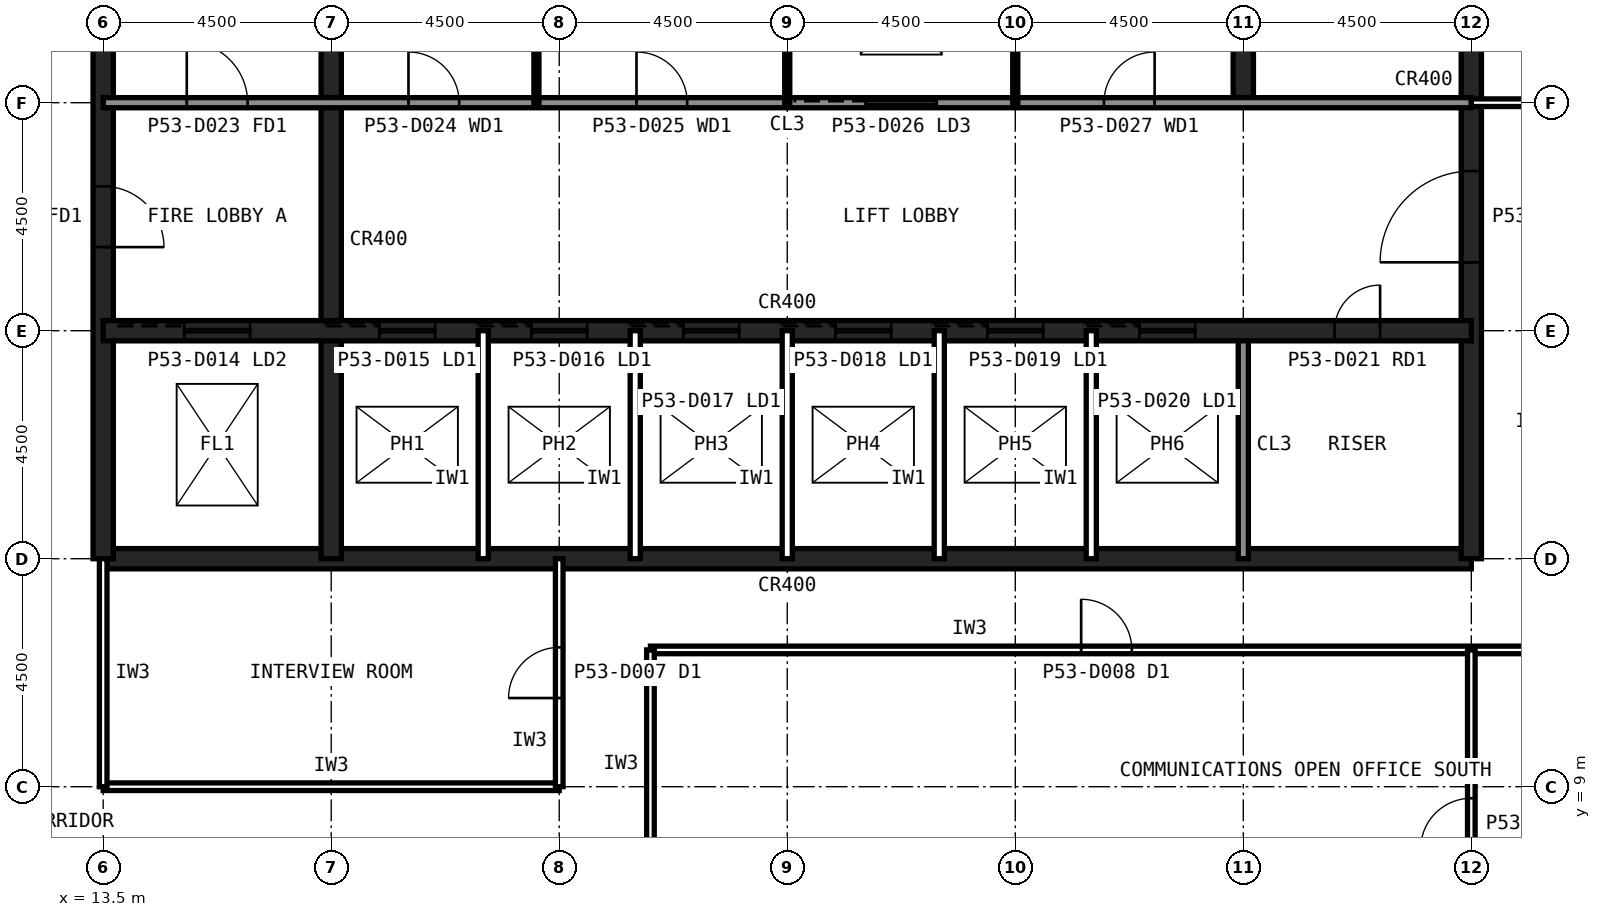
"""IFC4 building model, lengths in metres.
Left out: names, types, materials, properties, quantities, classifications, styles, units other than length and angle.
Written with IfcOpenShell. Run it as: python <this file> out.ifc"""

import sys

from ifc_helpers import new_model, si_unit, direction, frame, frame_2d, origin, place, context, subcontext, project, spatial, rectangle, extrude, element, fill, save


model = new_model("IFC4")
c1 = context("Model", 3, precision=1e-05, world=origin(), true_north=direction((0.0, 1.0)))
c2 = subcontext(c1, "Body", "Model", "MODEL_VIEW")
j1 = project(units=[si_unit("LENGTHUNIT", "METRE"), si_unit("PLANEANGLEUNIT", "RADIAN")], contexts=[c1])
p1 = place(None, origin())
s1 = spatial("IfcSite", under=j1, at=p1, CompositionType="ELEMENT")
p2 = place(p1, origin())
s2 = spatial("IfcBuilding", under=s1, at=p2, CompositionType="ELEMENT")
p3 = place(p2, frame((0.0, 0.0, 222.6)))
s3 = spatial("IfcBuildingStorey", under=s2, at=p3, CompositionType="ELEMENT", Elevation=222.6)
p4 = place(p3, frame((13.5, 13.5, 0.0), z_axis=(0.0, 0.0, 1.0), x_axis=(1.0, 0.0, 0.0)))
e1 = element("IfcWall", 1, at=p4, inside=s3, PredefinedType="SHEAR", context=c2, shape_type="SweptSolid", body=[
    extrude(rectangle(XDim=27.0, YDim=0.4, at=frame_2d((13.5, 0.0))), origin(), (0.0, 0.0, 1.0), 4.0),
])
p5 = place(p3, frame((40.5, 13.5, 0.0), z_axis=(0.0, 0.0, 1.0), x_axis=(0.0, 1.0, 0.0)))
e2 = element("IfcWall", 2, at=p5, inside=s3, PredefinedType="SHEAR", context=c2, shape_type="SweptSolid", body=[
    extrude(rectangle(XDim=27.0, YDim=0.4, at=frame_2d((13.5, 0.0))), origin(), (0.0, 0.0, 1.0), 4.0),
])
p6 = place(p5, frame((5.85, 0.0, 0.0)))
e3 = element("IfcOpeningElement", 3, at=p6, cuts=e2, PredefinedType="OPENING", context=c2, shape_type="SweptSolid", body=[
    extrude(rectangle(XDim=1.8, YDim=2.1, at=frame_2d((0.9, 1.05))), frame((0.0, 0.21, 0.0), z_axis=(0.0, -1.0, 0.0), x_axis=(1.0, 0.0, 0.0)), (0.0, 0.0, 1.0), 0.42),
])
p7 = place(p5, frame((19.65, 0.0, 0.0)))
e4 = element("IfcOpeningElement", 4, at=p7, cuts=e2, PredefinedType="OPENING", context=c2, shape_type="SweptSolid", body=[
    extrude(rectangle(XDim=1.2, YDim=2.1, at=frame_2d((0.6, 1.05))), frame((0.0, 0.21, 0.0), z_axis=(0.0, -1.0, 0.0), x_axis=(1.0, 0.0, 0.0)), (0.0, 0.0, 1.0), 0.42),
])
p8 = place(p3, frame((13.5, 40.5, 0.0), z_axis=(0.0, 0.0, 1.0), x_axis=(0.0, -1.0, 0.0)))
e5 = element("IfcWall", 5, at=p8, inside=s3, PredefinedType="SHEAR", context=c2, shape_type="SweptSolid", body=[
    extrude(rectangle(XDim=27.0, YDim=0.4, at=frame_2d((13.5, 0.0))), origin(), (0.0, 0.0, 1.0), 4.0),
])
p9 = place(p8, frame((19.65, 0.0, 0.0)))
e6 = element("IfcOpeningElement", 6, at=p9, cuts=e5, PredefinedType="OPENING", context=c2, shape_type="SweptSolid", body=[
    extrude(rectangle(XDim=1.2, YDim=2.1, at=frame_2d((0.6, 1.05))), frame((0.0, 0.21, 0.0), z_axis=(0.0, -1.0, 0.0), x_axis=(1.0, 0.0, 0.0)), (0.0, 0.0, 1.0), 0.42),
])
p10 = place(p8, frame((5.85, 0.0, 0.0)))
e7 = element("IfcOpeningElement", 7, at=p10, cuts=e5, PredefinedType="OPENING", context=c2, shape_type="SweptSolid", body=[
    extrude(rectangle(XDim=1.8, YDim=2.1, at=frame_2d((0.9, 1.05))), frame((0.0, 0.21, 0.0), z_axis=(0.0, -1.0, 0.0), x_axis=(1.0, 0.0, 0.0)), (0.0, 0.0, 1.0), 0.42),
])
p11 = place(p3, frame((18.0, 13.5, 0.0), z_axis=(0.0, 0.0, 1.0), x_axis=(0.0, 1.0, 0.0)))
e8 = element("IfcWall", 8, at=p11, inside=s3, PredefinedType="SHEAR", context=c2, shape_type="SweptSolid", body=[
    extrude(rectangle(XDim=18.0, YDim=0.4, at=frame_2d((9.0, 0.0))), origin(), (0.0, 0.0, 1.0), 4.0),
])
p12 = place(p3, frame((36.0, 13.5, 0.0), z_axis=(0.0, 0.0, 1.0), x_axis=(0.0, 1.0, 0.0)))
e9 = element("IfcWall", 9, at=p12, inside=s3, PredefinedType="SOLIDWALL", context=c2, shape_type="SweptSolid", body=[
    extrude(rectangle(XDim=4.5, YDim=0.2, at=frame_2d((2.25, 0.0))), origin(), (0.0, 0.0, 1.0), 3.84),
])
p13 = place(p3, frame((36.0, 22.5, 0.0), z_axis=(0.0, 0.0, 1.0), x_axis=(0.0, 1.0, 0.0)))
e10 = element("IfcWall", 10, at=p13, inside=s3, PredefinedType="SHEAR", context=c2, shape_type="SweptSolid", body=[
    extrude(rectangle(XDim=18.0, YDim=0.4, at=frame_2d((9.0, 0.0))), origin(), (0.0, 0.0, 1.0), 4.0),
])
p14 = place(p3, frame((13.5, 18.0, 0.0), z_axis=(0.0, 0.0, 1.0), x_axis=(1.0, 0.0, 0.0)))
e11 = element("IfcWall", 11, at=p14, inside=s3, PredefinedType="SHEAR", context=c2, shape_type="SweptSolid", body=[
    extrude(rectangle(XDim=27.0, YDim=0.4, at=frame_2d((13.5, 0.0))), origin(), (0.0, 0.0, 1.0), 4.0),
])
p15 = place(p14, frame((24.3, 0.0, 0.0)))
e12 = element("IfcOpeningElement", 12, at=p15, cuts=e11, PredefinedType="OPENING", context=c2, shape_type="SweptSolid", body=[
    extrude(rectangle(XDim=0.9, YDim=2.1, at=frame_2d((0.45, 1.05))), frame((0.0, 0.21, 0.0), z_axis=(0.0, -1.0, 0.0), x_axis=(1.0, 0.0, 0.0)), (0.0, 0.0, 1.0), 0.42),
])
p16 = place(p14, frame((5.45, 0.0, 0.0)))
e13 = element("IfcOpeningElement", 13, at=p16, cuts=e11, PredefinedType="OPENING", context=c2, shape_type="SweptSolid", body=[
    extrude(rectangle(XDim=1.1, YDim=2.1, at=frame_2d((0.55, 1.05))), frame((0.0, 0.21, 0.0), z_axis=(0.0, -1.0, 0.0), x_axis=(1.0, 0.0, 0.0)), (0.0, 0.0, 1.0), 0.42),
])
p17 = place(p14, frame((8.45, 0.0, 0.0)))
e14 = element("IfcOpeningElement", 14, at=p17, cuts=e11, PredefinedType="OPENING", context=c2, shape_type="SweptSolid", body=[
    extrude(rectangle(XDim=1.1, YDim=2.1, at=frame_2d((0.55, 1.05))), frame((0.0, 0.21, 0.0), z_axis=(0.0, -1.0, 0.0), x_axis=(1.0, 0.0, 0.0)), (0.0, 0.0, 1.0), 0.42),
])
p18 = place(p14, frame((11.45, 0.0, 0.0)))
e15 = element("IfcOpeningElement", 15, at=p18, cuts=e11, PredefinedType="OPENING", context=c2, shape_type="SweptSolid", body=[
    extrude(rectangle(XDim=1.1, YDim=2.1, at=frame_2d((0.55, 1.05))), frame((0.0, 0.21, 0.0), z_axis=(0.0, -1.0, 0.0), x_axis=(1.0, 0.0, 0.0)), (0.0, 0.0, 1.0), 0.42),
])
p19 = place(p14, frame((14.45, 0.0, 0.0)))
e16 = element("IfcOpeningElement", 16, at=p19, cuts=e11, PredefinedType="OPENING", context=c2, shape_type="SweptSolid", body=[
    extrude(rectangle(XDim=1.1, YDim=2.1, at=frame_2d((0.55, 1.05))), frame((0.0, 0.21, 0.0), z_axis=(0.0, -1.0, 0.0), x_axis=(1.0, 0.0, 0.0)), (0.0, 0.0, 1.0), 0.42),
])
p20 = place(p14, frame((17.45, 0.0, 0.0)))
e17 = element("IfcOpeningElement", 17, at=p20, cuts=e11, PredefinedType="OPENING", context=c2, shape_type="SweptSolid", body=[
    extrude(rectangle(XDim=1.1, YDim=2.1, at=frame_2d((0.55, 1.05))), frame((0.0, 0.21, 0.0), z_axis=(0.0, -1.0, 0.0), x_axis=(1.0, 0.0, 0.0)), (0.0, 0.0, 1.0), 0.42),
])
p21 = place(p14, frame((20.45, 0.0, 0.0)))
e18 = element("IfcOpeningElement", 18, at=p21, cuts=e11, PredefinedType="OPENING", context=c2, shape_type="SweptSolid", body=[
    extrude(rectangle(XDim=1.1, YDim=2.1, at=frame_2d((0.55, 1.05))), frame((0.0, 0.21, 0.0), z_axis=(0.0, -1.0, 0.0), x_axis=(1.0, 0.0, 0.0)), (0.0, 0.0, 1.0), 0.42),
])
p22 = place(p14, frame((1.6, 0.0, 0.0)))
e19 = element("IfcOpeningElement", 19, at=p22, cuts=e11, PredefinedType="OPENING", context=c2, shape_type="SweptSolid", body=[
    extrude(rectangle(XDim=1.3, YDim=2.2, at=frame_2d((0.65, 1.1))), frame((0.0, 0.21, 0.0), z_axis=(0.0, -1.0, 0.0), x_axis=(1.0, 0.0, 0.0)), (0.0, 0.0, 1.0), 0.42),
])
p23 = place(p3, frame((13.5, 22.5, 0.0), z_axis=(0.0, 0.0, 1.0), x_axis=(1.0, 0.0, 0.0)))
e20 = element("IfcWall", 20, at=p23, inside=s3, PredefinedType="SOLIDWALL", context=c2, shape_type="SweptSolid", body=[
    extrude(rectangle(XDim=27.0, YDim=0.2, at=frame_2d((13.5, 0.0))), origin(), (0.0, 0.0, 1.0), 3.84),
])
p24 = place(p23, frame((1.65, 0.0, 0.0)))
e21 = element("IfcOpeningElement", 21, at=p24, cuts=e20, PredefinedType="OPENING", context=c2, shape_type="SweptSolid", body=[
    extrude(rectangle(XDim=1.2, YDim=2.1, at=frame_2d((0.6, 1.05))), frame((0.0, 0.11, 0.0), z_axis=(0.0, -1.0, 0.0), x_axis=(1.0, 0.0, 0.0)), (0.0, 0.0, 1.0), 0.22),
])
p25 = place(p23, frame((6.025, 0.0, 0.0)))
e22 = element("IfcOpeningElement", 22, at=p25, cuts=e20, PredefinedType="OPENING", context=c2, shape_type="SweptSolid", body=[
    extrude(rectangle(XDim=1.0, YDim=2.1, at=frame_2d((0.5, 1.05))), frame((0.0, 0.11, 0.0), z_axis=(0.0, -1.0, 0.0), x_axis=(1.0, 0.0, 0.0)), (0.0, 0.0, 1.0), 0.22),
])
p26 = place(p23, frame((10.525, 0.0, 0.0)))
e23 = element("IfcOpeningElement", 23, at=p26, cuts=e20, PredefinedType="OPENING", context=c2, shape_type="SweptSolid", body=[
    extrude(rectangle(XDim=1.0, YDim=2.1, at=frame_2d((0.5, 1.05))), frame((0.0, 0.11, 0.0), z_axis=(0.0, -1.0, 0.0), x_axis=(1.0, 0.0, 0.0)), (0.0, 0.0, 1.0), 0.22),
])
p27 = place(p23, frame((19.75, 0.0, 0.0)))
e24 = element("IfcOpeningElement", 24, at=p27, cuts=e20, PredefinedType="OPENING", context=c2, shape_type="SweptSolid", body=[
    extrude(rectangle(XDim=1.0, YDim=2.1, at=frame_2d((0.5, 1.05))), frame((0.0, 0.11, 0.0), z_axis=(0.0, -1.0, 0.0), x_axis=(1.0, 0.0, 0.0)), (0.0, 0.0, 1.0), 0.22),
])
p28 = place(p23, frame((15.05, 0.0, 0.0)))
e25 = element("IfcOpeningElement", 25, at=p28, cuts=e20, PredefinedType="OPENING", context=c2, shape_type="SweptSolid", body=[
    extrude(rectangle(XDim=1.4, YDim=2.4, at=frame_2d((0.7, 1.2))), frame((0.0, 0.11, 0.0), z_axis=(0.0, -1.0, 0.0), x_axis=(1.0, 0.0, 0.0)), (0.0, 0.0, 1.0), 0.22),
])
for number, where, z_axis, x_axis in (
    (26, (21.0, 13.5, 0.0), (0.0, 0.0, 1.0), (0.0, 1.0, 0.0)),
    (27, (24.0, 13.5, 0.0), (0.0, 0.0, 1.0), (0.0, 1.0, 0.0)),
    (28, (27.0, 13.5, 0.0), (0.0, 0.0, 1.0), (0.0, 1.0, 0.0)),
    (29, (30.0, 13.5, 0.0), (0.0, 0.0, 1.0), (0.0, 1.0, 0.0)),
    (30, (33.0, 13.5, 0.0), (0.0, 0.0, 1.0), (0.0, 1.0, 0.0)),
):
    element("IfcWall", number, at=place(p3, frame(where, z_axis=z_axis, x_axis=x_axis)), inside=s3, PredefinedType="PARTITIONING", context=c2, shape_type="SweptSolid", body=[
        extrude(rectangle(XDim=4.5, YDim=0.2, at=frame_2d((2.25, 0.0))), origin(), (0.0, 0.0, 1.0), 3.84),
    ])
for number, where, z_axis, x_axis in (
    (31, (22.05, 22.5, 0.0), (0.0, 0.0, 1.0), (0.0, 1.0, 0.0)),
    (32, (27.0, 22.5, 0.0), (0.0, 0.0, 1.0), (0.0, 1.0, 0.0)),
    (33, (31.5, 22.5, 0.0), (0.0, 0.0, 1.0), (0.0, 1.0, 0.0)),
):
    element("IfcWall", number, at=place(p3, frame(where, z_axis=z_axis, x_axis=x_axis)), inside=s3, PredefinedType="PLUMBINGWALL", context=c2, shape_type="SweptSolid", body=[
        extrude(rectangle(XDim=9.0, YDim=0.1, at=frame_2d((4.5, 0.0))), origin(), (0.0, 0.0, 1.0), 3.84),
    ])
p29 = place(p3, frame((24.3, 11.7, 0.0), z_axis=(0.0, 0.0, 1.0), x_axis=(1.0, 0.0, 0.0)))
e34 = element("IfcWall", 34, at=p29, inside=s3, PredefinedType="PARTITIONING", context=c2, shape_type="SweptSolid", body=[
    extrude(rectangle(XDim=18.0, YDim=0.15, at=frame_2d((9.0, 0.0))), origin(), (0.0, 0.0, 1.0), 3.84),
])
p30 = place(p29, frame((8.5, 0.0, 0.0)))
e35 = element("IfcOpeningElement", 35, at=p30, cuts=e34, PredefinedType="OPENING", context=c2, shape_type="SweptSolid", body=[
    extrude(rectangle(XDim=1.0, YDim=2.1, at=frame_2d((0.5, 1.05))), frame((0.0, 0.085, 0.0), z_axis=(0.0, -1.0, 0.0), x_axis=(1.0, 0.0, 0.0)), (0.0, 0.0, 1.0), 0.17),
])
p31 = place(p3, frame((24.3, 7.2, 0.0), z_axis=(0.0, 0.0, 1.0), x_axis=(0.0, 1.0, 0.0)))
e36 = element("IfcWall", 36, at=p31, inside=s3, PredefinedType="PARTITIONING", context=c2, shape_type="SweptSolid", body=[
    extrude(rectangle(XDim=4.5, YDim=0.15, at=frame_2d((2.25, 0.0))), origin(), (0.0, 0.0, 1.0), 3.84),
])
p32 = place(p3, frame((13.5, 9.0, 0.0), z_axis=(0.0, 0.0, 1.0), x_axis=(1.0, 0.0, 0.0)))
e37 = element("IfcWall", 37, at=p32, inside=s3, PredefinedType="PARTITIONING", context=c2, shape_type="SweptSolid", body=[
    extrude(rectangle(XDim=9.0, YDim=0.15, at=frame_2d((4.5, 0.0))), origin(), (0.0, 0.0, 1.0), 3.84),
])
p33 = place(p3, frame((22.5, 9.0, 0.0), z_axis=(0.0, 0.0, 1.0), x_axis=(0.0, 1.0, 0.0)))
e38 = element("IfcWall", 38, at=p33, inside=s3, PredefinedType="PARTITIONING", context=c2, shape_type="SweptSolid", body=[
    extrude(rectangle(XDim=4.5, YDim=0.15, at=frame_2d((2.25, 0.0))), origin(), (0.0, 0.0, 1.0), 2.989),
])
p34 = place(p33, frame((1.75, 0.0, 0.0)))
e39 = element("IfcOpeningElement", 39, at=p34, cuts=e38, PredefinedType="OPENING", context=c2, shape_type="SweptSolid", body=[
    extrude(rectangle(XDim=1.0, YDim=2.1, at=frame_2d((0.5, 1.05))), frame((0.0, 0.085, 0.0), z_axis=(0.0, -1.0, 0.0), x_axis=(1.0, 0.0, 0.0)), (0.0, 0.0, 1.0), 0.17),
])
for number, where, z_axis, x_axis in (
    (40, (13.5, 13.5, 0.0), (0.0, 0.0, 1.0), (0.0, -1.0, 0.0)),
    (41, (40.5, 22.5, 0.0), (0.0, 0.0, 1.0), (1.0, 0.0, 0.0)),
):
    element("IfcWall", number, at=place(p3, frame(where, z_axis=z_axis, x_axis=x_axis)), inside=s3, PredefinedType="PARTITIONING", context=c2, shape_type="SweptSolid", body=[
        extrude(rectangle(XDim=4.5, YDim=0.15, at=frame_2d((2.25, 0.0))), origin(), (0.0, 0.0, 1.0), 2.989),
    ])
p35 = place(p3, frame((40.5, 4.845, 0.0), z_axis=(0.0, 0.0, 1.0), x_axis=(0.0, 1.0, 0.0)))
e42 = element("IfcWall", 42, at=p35, inside=s3, PredefinedType="PARTITIONING", context=c2, shape_type="SweptSolid", body=[
    extrude(rectangle(XDim=6.855, YDim=0.15, at=frame_2d((3.427, 0.0))), origin(), (0.0, 0.0, 1.0), 2.989),
])
p36 = place(p35, frame((2.927, 0.0, 0.0)))
e43 = element("IfcOpeningElement", 43, at=p36, cuts=e42, PredefinedType="OPENING", context=c2, shape_type="SweptSolid", body=[
    extrude(rectangle(XDim=1.0, YDim=2.1, at=frame_2d((0.5, 1.05))), frame((0.0, 0.085, 0.0), z_axis=(0.0, -1.0, 0.0), x_axis=(1.0, 0.0, 0.0)), (0.0, 0.0, 1.0), 0.17),
])
p37 = place(p9, origin())
e44 = element("IfcDoor", 44, at=p37, inside=s3, OperationType="SINGLE_SWING_RIGHT", PredefinedType="DOOR", context=c2, shape_type="SweptSolid", body=[
    extrude(rectangle(XDim=1.2, YDim=2.1, at=frame_2d((0.6, 1.05))), frame((0.0, 0.025, 0.0), z_axis=(0.0, -1.0, 0.0), x_axis=(1.0, 0.0, 0.0)), (0.0, 0.0, 1.0), 0.05),
])
fill(e6, e44)
p38 = place(p6, origin())
e45 = element("IfcDoor", 45, at=p38, inside=s3, OperationType="SINGLE_SWING_LEFT", PredefinedType="DOOR", context=c2, shape_type="SweptSolid", body=[
    extrude(rectangle(XDim=1.8, YDim=2.1, at=frame_2d((0.9, 1.05))), frame((0.0, 0.025, 0.0), z_axis=(0.0, -1.0, 0.0), x_axis=(1.0, 0.0, 0.0)), (0.0, 0.0, 1.0), 0.05),
])
fill(e3, e45)
p39 = place(p24, origin())
e46 = element("IfcDoor", 46, at=p39, inside=s3, OperationType="SINGLE_SWING_LEFT", PredefinedType="DOOR", context=c2, shape_type="SweptSolid", body=[
    extrude(rectangle(XDim=1.2, YDim=2.1, at=frame_2d((0.6, 1.05))), frame((0.0, 0.025, 0.0), z_axis=(0.0, -1.0, 0.0), x_axis=(1.0, 0.0, 0.0)), (0.0, 0.0, 1.0), 0.05),
])
fill(e21, e46)
p40 = place(p25, origin())
e47 = element("IfcDoor", 47, at=p40, inside=s3, OperationType="SINGLE_SWING_LEFT", PredefinedType="DOOR", context=c2, shape_type="SweptSolid", body=[
    extrude(rectangle(XDim=1.0, YDim=2.1, at=frame_2d((0.5, 1.05))), frame((0.0, 0.025, 0.0), z_axis=(0.0, -1.0, 0.0), x_axis=(1.0, 0.0, 0.0)), (0.0, 0.0, 1.0), 0.05),
])
fill(e22, e47)
p41 = place(p26, origin())
e48 = element("IfcDoor", 48, at=p41, inside=s3, OperationType="SINGLE_SWING_LEFT", PredefinedType="DOOR", context=c2, shape_type="SweptSolid", body=[
    extrude(rectangle(XDim=1.0, YDim=2.1, at=frame_2d((0.5, 1.05))), frame((0.0, 0.025, 0.0), z_axis=(0.0, -1.0, 0.0), x_axis=(1.0, 0.0, 0.0)), (0.0, 0.0, 1.0), 0.05),
])
fill(e23, e48)
p42 = place(p27, origin())
e49 = element("IfcDoor", 49, at=p42, inside=s3, OperationType="SINGLE_SWING_RIGHT", PredefinedType="DOOR", context=c2, shape_type="SweptSolid", body=[
    extrude(rectangle(XDim=1.0, YDim=2.1, at=frame_2d((0.5, 1.05))), frame((0.0, 0.025, 0.0), z_axis=(0.0, -1.0, 0.0), x_axis=(1.0, 0.0, 0.0)), (0.0, 0.0, 1.0), 0.05),
])
fill(e24, e49)
p43 = place(p15, origin())
e50 = element("IfcDoor", 50, at=p43, inside=s3, OperationType="SINGLE_SWING_RIGHT", PredefinedType="DOOR", context=c2, shape_type="SweptSolid", body=[
    extrude(rectangle(XDim=0.9, YDim=2.1, at=frame_2d((0.45, 1.05))), frame((0.0, 0.025, 0.0), z_axis=(0.0, -1.0, 0.0), x_axis=(1.0, 0.0, 0.0)), (0.0, 0.0, 1.0), 0.05),
])
fill(e12, e50)
p44 = place(p16, origin())
e51 = element("IfcDoor", 51, at=p44, inside=s3, OperationType="SLIDING_TO_LEFT", PredefinedType="DOOR", context=c2, shape_type="SweptSolid", body=[
    extrude(rectangle(XDim=1.1, YDim=2.1, at=frame_2d((0.55, 1.05))), frame((0.0, 0.025, 0.0), z_axis=(0.0, -1.0, 0.0), x_axis=(1.0, 0.0, 0.0)), (0.0, 0.0, 1.0), 0.05),
])
fill(e13, e51)
p45 = place(p17, origin())
e52 = element("IfcDoor", 52, at=p45, inside=s3, OperationType="SLIDING_TO_LEFT", PredefinedType="DOOR", context=c2, shape_type="SweptSolid", body=[
    extrude(rectangle(XDim=1.1, YDim=2.1, at=frame_2d((0.55, 1.05))), frame((0.0, 0.025, 0.0), z_axis=(0.0, -1.0, 0.0), x_axis=(1.0, 0.0, 0.0)), (0.0, 0.0, 1.0), 0.05),
])
fill(e14, e52)
p46 = place(p18, origin())
e53 = element("IfcDoor", 53, at=p46, inside=s3, OperationType="SLIDING_TO_LEFT", PredefinedType="DOOR", context=c2, shape_type="SweptSolid", body=[
    extrude(rectangle(XDim=1.1, YDim=2.1, at=frame_2d((0.55, 1.05))), frame((0.0, 0.025, 0.0), z_axis=(0.0, -1.0, 0.0), x_axis=(1.0, 0.0, 0.0)), (0.0, 0.0, 1.0), 0.05),
])
fill(e15, e53)
p47 = place(p19, origin())
e54 = element("IfcDoor", 54, at=p47, inside=s3, OperationType="SLIDING_TO_LEFT", PredefinedType="DOOR", context=c2, shape_type="SweptSolid", body=[
    extrude(rectangle(XDim=1.1, YDim=2.1, at=frame_2d((0.55, 1.05))), frame((0.0, 0.025, 0.0), z_axis=(0.0, -1.0, 0.0), x_axis=(1.0, 0.0, 0.0)), (0.0, 0.0, 1.0), 0.05),
])
fill(e16, e54)
p48 = place(p20, origin())
e55 = element("IfcDoor", 55, at=p48, inside=s3, OperationType="SLIDING_TO_LEFT", PredefinedType="DOOR", context=c2, shape_type="SweptSolid", body=[
    extrude(rectangle(XDim=1.1, YDim=2.1, at=frame_2d((0.55, 1.05))), frame((0.0, 0.025, 0.0), z_axis=(0.0, -1.0, 0.0), x_axis=(1.0, 0.0, 0.0)), (0.0, 0.0, 1.0), 0.05),
])
fill(e17, e55)
p49 = place(p21, origin())
e56 = element("IfcDoor", 56, at=p49, inside=s3, OperationType="SLIDING_TO_LEFT", PredefinedType="DOOR", context=c2, shape_type="SweptSolid", body=[
    extrude(rectangle(XDim=1.1, YDim=2.1, at=frame_2d((0.55, 1.05))), frame((0.0, 0.025, 0.0), z_axis=(0.0, -1.0, 0.0), x_axis=(1.0, 0.0, 0.0)), (0.0, 0.0, 1.0), 0.05),
])
fill(e18, e56)
p50 = place(p22, origin())
e57 = element("IfcDoor", 57, at=p50, inside=s3, OperationType="SLIDING_TO_LEFT", PredefinedType="DOOR", context=c2, shape_type="SweptSolid", body=[
    extrude(rectangle(XDim=1.3, YDim=2.2, at=frame_2d((0.65, 1.1))), frame((0.0, 0.025, 0.0), z_axis=(0.0, -1.0, 0.0), x_axis=(1.0, 0.0, 0.0)), (0.0, 0.0, 1.0), 0.05),
])
fill(e19, e57)
p51 = place(p28, origin())
e58 = element("IfcDoor", 58, at=p51, inside=s3, OperationType="SLIDING_TO_LEFT", PredefinedType="DOOR", context=c2, shape_type="SweptSolid", body=[
    extrude(rectangle(XDim=1.4, YDim=2.4, at=frame_2d((0.7, 1.2))), frame((0.0, 0.025, 0.0), z_axis=(0.0, -1.0, 0.0), x_axis=(1.0, 0.0, 0.0)), (0.0, 0.0, 1.0), 0.05),
])
fill(e25, e58)
p52 = place(p30, origin())
e59 = element("IfcDoor", 59, at=p52, inside=s3, OperationType="SINGLE_SWING_LEFT", PredefinedType="DOOR", context=c2, shape_type="SweptSolid", body=[
    extrude(rectangle(XDim=1.0, YDim=2.1, at=frame_2d((0.5, 1.05))), frame((0.0, 0.025, 0.0), z_axis=(0.0, -1.0, 0.0), x_axis=(1.0, 0.0, 0.0)), (0.0, 0.0, 1.0), 0.05),
])
fill(e35, e59)
p53 = place(p34, origin())
e60 = element("IfcDoor", 60, at=p53, inside=s3, OperationType="SINGLE_SWING_LEFT", PredefinedType="DOOR", context=c2, shape_type="SweptSolid", body=[
    extrude(rectangle(XDim=1.0, YDim=2.1, at=frame_2d((0.5, 1.05))), frame((0.0, 0.025, 0.0), z_axis=(0.0, -1.0, 0.0), x_axis=(1.0, 0.0, 0.0)), (0.0, 0.0, 1.0), 0.05),
])
fill(e39, e60)
p54 = place(p36, origin())
e61 = element("IfcDoor", 61, at=p54, inside=s3, OperationType="SINGLE_SWING_LEFT", PredefinedType="DOOR", context=c2, shape_type="SweptSolid", body=[
    extrude(rectangle(XDim=1.0, YDim=2.1, at=frame_2d((0.5, 1.05))), frame((0.0, 0.025, 0.0), z_axis=(0.0, -1.0, 0.0), x_axis=(1.0, 0.0, 0.0)), (0.0, 0.0, 1.0), 0.05),
])
fill(e43, e61)
save(model, sys.argv[1])
